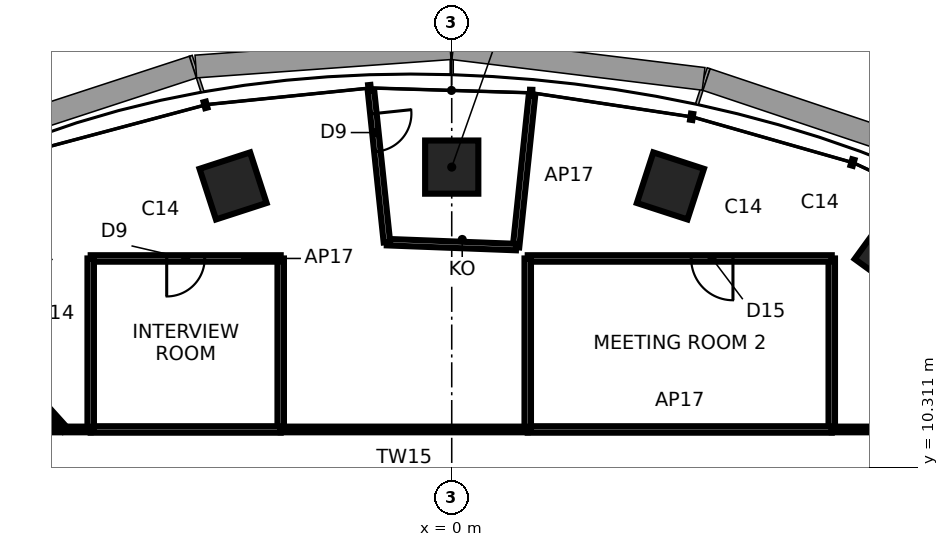
"""IFC4 building model, lengths in metres.
Left out: names, types, materials, properties, quantities, classifications, styles, units other than length and angle.
Written with IfcOpenShell. Run it as: python <this file> out.ifc"""

import sys

from ifc_helpers import new_model, si_unit, direction, frame, frame_2d, origin, origin_2d, place, context, subcontext, project, spatial, rectangle, extrude, element, fill, save


model = new_model("IFC4")
c1 = context("Model", 3, precision=1e-05, world=origin(), true_north=direction((0.0, 1.0)))
c2 = subcontext(c1, "Body", "Model", "MODEL_VIEW")
j1 = project(units=[si_unit("LENGTHUNIT", "METRE"), si_unit("PLANEANGLEUNIT", "RADIAN")], contexts=[c1])
p1 = place(None, origin())
s1 = spatial("IfcSite", under=j1, at=p1, CompositionType="ELEMENT")
p2 = place(p1, origin())
s2 = spatial("IfcBuilding", under=s1, at=p2, CompositionType="ELEMENT")
p3 = place(p2, frame((0.0, 0.0, 207.2)))
s3 = spatial("IfcBuildingStorey", under=s2, at=p3, CompositionType="ELEMENT", Elevation=207.2)
for number, where, z_axis, x_axis in (
    (1, (11.581, 15.94, 0.0), (0.0, 0.0, 1.0), (0.588, 0.809, 0.0)),
    (2, (5.754, 17.708, 0.0), (0.0, 0.0, 1.0), (0.309, 0.951, 0.0)),
    (3, (0.0, 18.204, 0.0), (0.0, 0.0, 1.0), (0.0, 1.0, 0.0)),
    (4, (-5.754, 17.708, 0.0), (0.0, 0.0, 1.0), (-0.309, 0.951, 0.0)),
):
    element("IfcColumn", number, at=place(p3, frame(where, z_axis=z_axis, x_axis=x_axis)), inside=s3, PredefinedType="COLUMN", context=c2, shape_type="SweptSolid", body=[
        extrude(rectangle(XDim=1.4, YDim=1.4, at=origin_2d()), origin(), (0.0, 0.0, 1.0), 3.9),
    ])
p4 = place(p3, frame((16.0, 11.3, 0.0), z_axis=(0.0, 0.0, 1.0), x_axis=(-1.0, 0.0, 0.0)))
e5 = element("IfcWall", 5, at=p4, inside=s3, PredefinedType="PARTITIONING", context=c2, shape_type="SweptSolid", body=[
    extrude(rectangle(XDim=6.0, YDim=0.15, at=frame_2d((3.0, 0.0))), origin(), (0.0, 0.0, 1.0), 3.74),
])
p5 = place(p3, frame((10.0, 11.3, 0.0), z_axis=(0.0, 0.0, 1.0), x_axis=(0.0, 1.0, 0.0)))
e6 = element("IfcWall", 6, at=p5, inside=s3, PredefinedType="PARTITIONING", context=c2, shape_type="SweptSolid", body=[
    extrude(rectangle(XDim=4.5, YDim=0.17, at=frame_2d((2.25, 0.0))), origin(), (0.0, 0.0, 1.0), 3.74),
])
p6 = place(p3, frame((2.0, 11.3, 0.0), z_axis=(0.0, 0.0, 1.0), x_axis=(1.0, 0.0, 0.0)))
e7 = element("IfcWall", 7, at=p6, inside=s3, PredefinedType="PARTITIONING", context=c2, shape_type="SweptSolid", body=[
    extrude(rectangle(XDim=8.0, YDim=0.17, at=frame_2d((4.0, 0.0))), origin(), (0.0, 0.0, 1.0), 3.74),
])
p7 = place(p3, frame((10.0, 15.8, 0.0), z_axis=(0.0, 0.0, 1.0), x_axis=(-1.0, 0.0, 0.0)))
e8 = element("IfcWall", 8, at=p7, inside=s3, PredefinedType="PARTITIONING", context=c2, shape_type="SweptSolid", body=[
    extrude(rectangle(XDim=8.0, YDim=0.17, at=frame_2d((4.0, 0.0))), origin(), (0.0, 0.0, 1.0), 3.74),
])
p8 = place(p7, frame((2.6, 0.0, 0.0)))
e9 = element("IfcOpeningElement", 9, at=p8, cuts=e8, PredefinedType="OPENING", context=c2, shape_type="SweptSolid", body=[
    extrude(rectangle(XDim=1.1, YDim=2.4, at=frame_2d((0.55, 1.2))), frame((0.0, 0.095, 0.0), z_axis=(0.0, -1.0, 0.0), x_axis=(1.0, 0.0, 0.0)), (0.0, 0.0, 1.0), 0.19),
])
p9 = place(p3, frame((2.0, 15.8, 0.0), z_axis=(0.0, 0.0, 1.0), x_axis=(0.0, -1.0, 0.0)))
e10 = element("IfcWall", 10, at=p9, inside=s3, PredefinedType="PARTITIONING", context=c2, shape_type="SweptSolid", body=[
    extrude(rectangle(XDim=4.5, YDim=0.17, at=frame_2d((2.25, 0.0))), origin(), (0.0, 0.0, 1.0), 3.74),
])
p10 = place(p3, frame((1.692, 16.1, 0.0), z_axis=(0.0, 0.0, 1.0), x_axis=(0.104548171712, 0.99451982373, 0.0)))
e11 = element("IfcWall", 11, at=p10, inside=s3, PredefinedType="PARTITIONING", context=c2, shape_type="SweptSolid", body=[
    extrude(rectangle(XDim=4.0, YDim=0.17, at=frame_2d((2.0, 0.0))), origin(), (0.0, 0.0, 1.0), 3.74),
])
p11 = place(p3, frame((-1.706, 16.229, 0.0), z_axis=(0.0, 0.0, 1.0), x_axis=(0.999275737391, -0.038052603881, 0.0)))
e12 = element("IfcWall", 12, at=p11, inside=s3, PredefinedType="PARTITIONING", context=c2, shape_type="SweptSolid", body=[
    extrude(rectangle(XDim=3.4, YDim=0.17, at=frame_2d((1.7, 0.0))), origin(), (0.0, 0.0, 1.0), 3.74),
])
p12 = place(p3, frame((-2.124, 20.207, 0.0), z_axis=(0.0, 0.0, 1.0), x_axis=(0.104494148666, -0.99452550138, 0.0)))
e13 = element("IfcWall", 13, at=p12, inside=s3, PredefinedType="PARTITIONING", context=c2, shape_type="SweptSolid", body=[
    extrude(rectangle(XDim=4.0, YDim=0.17, at=frame_2d((2.0, 0.0))), origin(), (0.0, 0.0, 1.0), 3.74),
])
p13 = place(p12, frame((0.6, 0.0, 0.0)))
e14 = element("IfcOpeningElement", 14, at=p13, cuts=e13, PredefinedType="OPENING", context=c2, shape_type="SweptSolid", body=[
    extrude(rectangle(XDim=1.0, YDim=2.4, at=frame_2d((0.5, 1.2))), frame((0.0, 0.095, 0.0), z_axis=(0.0, -1.0, 0.0), x_axis=(1.0, 0.0, 0.0)), (0.0, 0.0, 1.0), 0.19),
])
p14 = place(p3, frame((2.0, 11.3, 0.0), z_axis=(0.0, 0.0, 1.0), x_axis=(-1.0, 0.0, 0.0)))
e15 = element("IfcWall", 15, at=p14, inside=s3, PredefinedType="PARTITIONING", context=c2, shape_type="SweptSolid", body=[
    extrude(rectangle(XDim=6.5, YDim=0.15, at=frame_2d((3.25, 0.0))), origin(), (0.0, 0.0, 1.0), 3.74),
])
p15 = place(p3, frame((-4.5, 11.3, 0.0), z_axis=(0.0, 0.0, 1.0), x_axis=(0.0, 1.0, 0.0)))
e16 = element("IfcWall", 16, at=p15, inside=s3, PredefinedType="PARTITIONING", context=c2, shape_type="SweptSolid", body=[
    extrude(rectangle(XDim=4.5, YDim=0.17, at=frame_2d((2.25, 0.0))), origin(), (0.0, 0.0, 1.0), 3.74),
])
p16 = place(p3, frame((-4.5, 15.8, 0.0), z_axis=(0.0, 0.0, 1.0), x_axis=(-1.0, 0.0, 0.0)))
e17 = element("IfcWall", 17, at=p16, inside=s3, PredefinedType="PARTITIONING", context=c2, shape_type="SweptSolid", body=[
    extrude(rectangle(XDim=5.0, YDim=0.17, at=frame_2d((2.5, 0.0))), origin(), (0.0, 0.0, 1.0), 3.74),
])
p17 = place(p16, frame((2.0, 0.0, 0.0)))
e18 = element("IfcOpeningElement", 18, at=p17, cuts=e17, PredefinedType="OPENING", context=c2, shape_type="SweptSolid", body=[
    extrude(rectangle(XDim=1.0, YDim=2.4, at=frame_2d((0.5, 1.2))), frame((0.0, 0.095, 0.0), z_axis=(0.0, -1.0, 0.0), x_axis=(1.0, 0.0, 0.0)), (0.0, 0.0, 1.0), 0.19),
])
p18 = place(p3, frame((-9.5, 11.3, 0.0), z_axis=(0.0, 0.0, 1.0), x_axis=(1.0, 0.0, 0.0)))
e19 = element("IfcWall", 19, at=p18, inside=s3, PredefinedType="PARTITIONING", context=c2, shape_type="SweptSolid", body=[
    extrude(rectangle(XDim=5.0, YDim=0.17, at=frame_2d((2.5, 0.0))), origin(), (0.0, 0.0, 1.0), 3.74),
])
p19 = place(p3, frame((-9.5, 15.8, 0.0), z_axis=(0.0, 0.0, 1.0), x_axis=(0.0, -1.0, 0.0)))
e20 = element("IfcWall", 20, at=p19, inside=s3, PredefinedType="PARTITIONING", context=c2, shape_type="SweptSolid", body=[
    extrude(rectangle(XDim=4.5, YDim=0.17, at=frame_2d((2.25, 0.0))), origin(), (0.0, 0.0, 1.0), 3.74),
])
p20 = place(p3, frame((-10.175, 11.3, 0.0), z_axis=(0.0, 0.0, 1.0), x_axis=(-0.669133581883, 0.743142146293, 0.0)))
e21 = element("IfcWall", 21, at=p20, inside=s3, PredefinedType="PARTITIONING", context=c2, shape_type="SweptSolid", body=[
    extrude(rectangle(XDim=7.109, YDim=0.15, at=frame_2d((3.554, 0.0))), origin(), (0.0, 0.0, 1.0), 3.74),
])
p21 = place(p3, frame((-9.5, 11.3, 0.0), z_axis=(0.0, 0.0, 1.0), x_axis=(-1.0, 0.0, 0.0)))
e22 = element("IfcWall", 22, at=p21, inside=s3, PredefinedType="PARTITIONING", context=c2, shape_type="SweptSolid", body=[
    extrude(rectangle(XDim=4.7, YDim=0.15, at=frame_2d((2.35, 0.0))), origin(), (0.0, 0.0, 1.0), 3.74),
])
p22 = place(p13, origin())
e23 = element("IfcDoor", 23, at=p22, inside=s3, OperationType="SINGLE_SWING_LEFT", PredefinedType="DOOR", context=c2, shape_type="SweptSolid", body=[
    extrude(rectangle(XDim=1.0, YDim=2.4, at=frame_2d((0.5, 1.2))), frame((0.0, 0.025, 0.0), z_axis=(0.0, -1.0, 0.0), x_axis=(1.0, 0.0, 0.0)), (0.0, 0.0, 1.0), 0.05),
])
fill(e14, e23)
p23 = place(p8, origin())
e24 = element("IfcDoor", 24, at=p23, inside=s3, OperationType="SINGLE_SWING_LEFT", PredefinedType="DOOR", context=c2, shape_type="SweptSolid", body=[
    extrude(rectangle(XDim=1.1, YDim=2.4, at=frame_2d((0.55, 1.2))), frame((0.0, 0.025, 0.0), z_axis=(0.0, -1.0, 0.0), x_axis=(1.0, 0.0, 0.0)), (0.0, 0.0, 1.0), 0.05),
])
fill(e9, e24)
p24 = place(p17, origin())
e25 = element("IfcDoor", 25, at=p24, inside=s3, OperationType="SINGLE_SWING_RIGHT", PredefinedType="DOOR", context=c2, shape_type="SweptSolid", body=[
    extrude(rectangle(XDim=1.0, YDim=2.4, at=frame_2d((0.5, 1.2))), frame((0.0, 0.025, 0.0), z_axis=(0.0, -1.0, 0.0), x_axis=(1.0, 0.0, 0.0)), (0.0, 0.0, 1.0), 0.05),
])
fill(e18, e25)
save(model, sys.argv[1])
